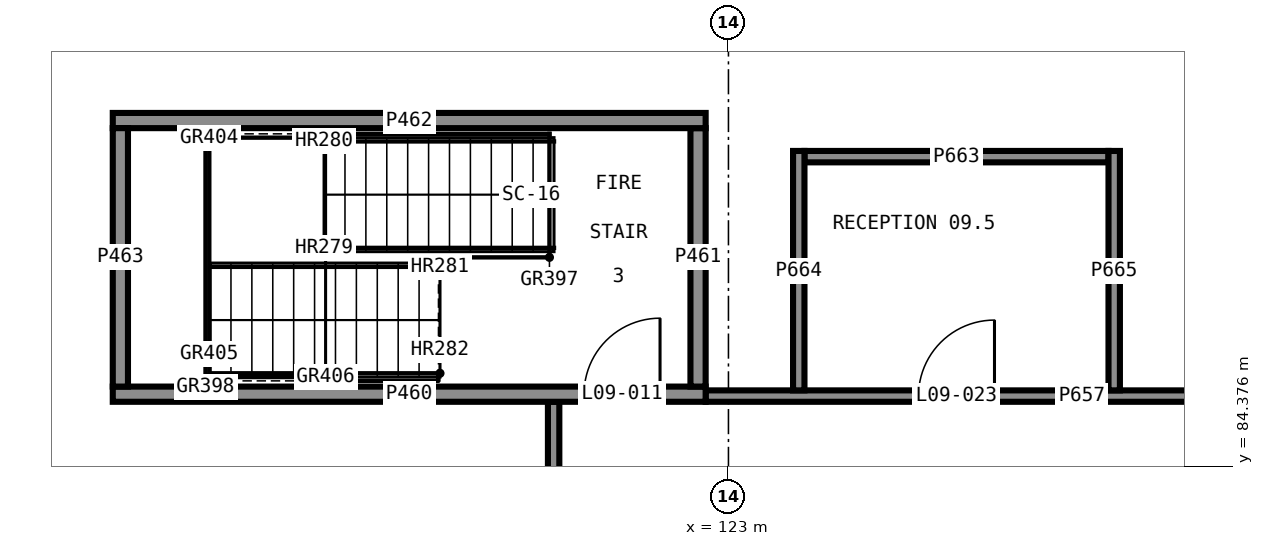
"""IFC4 building model, lengths in metres.
Left out: names, types, materials, properties, quantities, classifications, styles, units other than length and angle.
Written with IfcOpenShell. Run it as: python <this file> out.ifc"""

import sys

from ifc_helpers import new_model, si_unit, direction, frame, frame_2d, origin, place, context, subcontext, project, spatial, rectangle, extrude, element, fill, save


model = new_model("IFC4")
c1 = context("Model", 3, precision=1e-05, world=origin(), true_north=direction((0.0, 1.0)))
c2 = subcontext(c1, "Body", "Model", "MODEL_VIEW")
j1 = project(units=[si_unit("LENGTHUNIT", "METRE"), si_unit("PLANEANGLEUNIT", "RADIAN")], contexts=[c1])
p1 = place(None, origin())
s1 = spatial("IfcSite", under=j1, at=p1, CompositionType="ELEMENT")
p2 = place(p1, origin())
s2 = spatial("IfcBuilding", under=s1, at=p2, CompositionType="ELEMENT")
p3 = place(p2, frame((0.0, 0.0, 37.5)))
s3 = spatial("IfcBuildingStorey", under=s2, at=p3, CompositionType="ELEMENT", Elevation=37.5)
p4 = place(p3, frame((114.9, 85.325, 0.0), z_axis=(0.0, 0.0, 1.0), x_axis=(1.0, 0.0, 0.0)))
e1 = element("IfcWall", 1, at=p4, inside=s3, PredefinedType="SHEAR", context=c2, shape_type="SweptSolid", body=[
    extrude(rectangle(XDim=7.8, YDim=0.2, at=frame_2d((3.9, 0.0))), origin(), (0.0, 0.0, 1.0), 3.58),
])
p5 = place(p4, frame((6.2, 0.0, 0.0)))
e2 = element("IfcOpeningElement", 2, at=p5, cuts=e1, PredefinedType="OPENING", context=c2, shape_type="SweptSolid", body=[
    extrude(rectangle(XDim=1.0, YDim=2.1, at=frame_2d((0.5, 1.05))), frame((0.0, 0.11, 0.0), z_axis=(0.0, -1.0, 0.0), x_axis=(1.0, 0.0, 0.0)), (0.0, 0.0, 1.0), 0.22),
])
p6 = place(p3, frame((122.6, 85.425, 0.0), z_axis=(0.0, 0.0, 1.0), x_axis=(0.0, 1.0, 0.0)))
e3 = element("IfcWall", 3, at=p6, inside=s3, PredefinedType="SHEAR", context=c2, shape_type="SweptSolid", body=[
    extrude(rectangle(XDim=3.4, YDim=0.2, at=frame_2d((1.7, 0.0))), origin(), (0.0, 0.0, 1.0), 3.58),
])
p7 = place(p3, frame((122.7, 88.925, 0.0), z_axis=(0.0, 0.0, 1.0), x_axis=(-1.0, 0.0, 0.0)))
e4 = element("IfcWall", 4, at=p7, inside=s3, PredefinedType="SHEAR", context=c2, shape_type="SweptSolid", body=[
    extrude(rectangle(XDim=7.8, YDim=0.2, at=frame_2d((3.9, 0.0))), origin(), (0.0, 0.0, 1.0), 3.58),
])
p8 = place(p3, frame((115.0, 88.825, 0.0), z_axis=(0.0, 0.0, 1.0), x_axis=(0.0, -1.0, 0.0)))
e5 = element("IfcWall", 5, at=p8, inside=s3, PredefinedType="SHEAR", context=c2, shape_type="SweptSolid", body=[
    extrude(rectangle(XDim=3.4, YDim=0.2, at=frame_2d((1.7, 0.0))), origin(), (0.0, 0.0, 1.0), 3.58),
])
p9 = place(p3, frame((120.7, 62.7, 0.0), z_axis=(0.0, 0.0, 1.0), x_axis=(0.0, 1.0, 0.0)))
e6 = element("IfcWall", 6, at=p9, inside=s3, PredefinedType="PARTITIONING", context=c2, shape_type="SweptSolid", body=[
    extrude(rectangle(XDim=22.525, YDim=0.15, at=frame_2d((11.263, 0.0))), origin(), (0.0, 0.0, 1.0), 3.58),
])
p10 = place(p9, frame((16.435, 0.0, 0.0)))
e7 = element("IfcOpeningElement", 7, at=p10, cuts=e6, PredefinedType="OPENING", context=c2, shape_type="SweptSolid", body=[
    extrude(rectangle(XDim=1.0, YDim=2.1, at=frame_2d((0.5, 1.05))), frame((0.0, 0.085, 0.0), z_axis=(0.0, -1.0, 0.0), x_axis=(1.0, 0.0, 0.0)), (0.0, 0.0, 1.0), 0.17),
])
p11 = place(p3, frame((122.7, 85.3, 0.0), z_axis=(0.0, 0.0, 1.0), x_axis=(1.0, 0.0, 0.0)))
e8 = element("IfcWall", 8, at=p11, inside=s3, PredefinedType="PARTITIONING", context=c2, shape_type="SweptSolid", body=[
    extrude(rectangle(XDim=9.9, YDim=0.15, at=frame_2d((4.95, 0.0))), origin(), (0.0, 0.0, 1.0), 3.58),
])
p12 = place(p11, frame((2.8, 0.0, 0.0)))
e9 = element("IfcOpeningElement", 9, at=p12, cuts=e8, PredefinedType="OPENING", context=c2, shape_type="SweptSolid", body=[
    extrude(rectangle(XDim=1.0, YDim=2.1, at=frame_2d((0.5, 1.05))), frame((0.0, 0.085, 0.0), z_axis=(0.0, -1.0, 0.0), x_axis=(1.0, 0.0, 0.0)), (0.0, 0.0, 1.0), 0.17),
])
p13 = place(p3, frame((124.0, 88.45, 0.0), z_axis=(0.0, 0.0, 1.0), x_axis=(1.0, 0.0, 0.0)))
e10 = element("IfcWall", 10, at=p13, inside=s3, PredefinedType="PARTITIONING", context=c2, shape_type="SweptSolid", body=[
    extrude(rectangle(XDim=4.0, YDim=0.15, at=frame_2d((2.0, 0.0))), origin(), (0.0, 0.0, 1.0), 3.58),
])
for number, where, z_axis, x_axis in (
    (11, (123.925, 85.375, 0.0), (0.0, 0.0, 1.0), (0.0, 1.0, 0.0)),
    (12, (128.075, 85.375, 0.0), (0.0, 0.0, 1.0), (0.0, 1.0, 0.0)),
):
    element("IfcWall", number, at=place(p3, frame(where, z_axis=z_axis, x_axis=x_axis)), inside=s3, PredefinedType="PARTITIONING", context=c2, shape_type="SweptSolid", body=[
        extrude(rectangle(XDim=3.15, YDim=0.15, at=frame_2d((1.575, 0.0))), origin(), (0.0, 0.0, 1.0), 3.58),
    ])
p14 = place(p5, origin())
e13 = element("IfcDoor", 13, at=p14, inside=s3, OperationType="SINGLE_SWING_LEFT", PredefinedType="DOOR", context=c2, shape_type="SweptSolid", body=[
    extrude(rectangle(XDim=1.0, YDim=2.1, at=frame_2d((0.5, 1.05))), frame((0.0, 0.025, 0.0), z_axis=(0.0, -1.0, 0.0), x_axis=(1.0, 0.0, 0.0)), (0.0, 0.0, 1.0), 0.05),
])
fill(e2, e13)
p15 = place(p12, origin())
e14 = element("IfcDoor", 14, at=p15, inside=s3, OperationType="SINGLE_SWING_LEFT", PredefinedType="DOOR", context=c2, shape_type="SweptSolid", body=[
    extrude(rectangle(XDim=1.0, YDim=2.1, at=frame_2d((0.5, 1.05))), frame((0.0, 0.025, 0.0), z_axis=(0.0, -1.0, 0.0), x_axis=(1.0, 0.0, 0.0)), (0.0, 0.0, 1.0), 0.05),
])
fill(e9, e14)
save(model, sys.argv[1])
